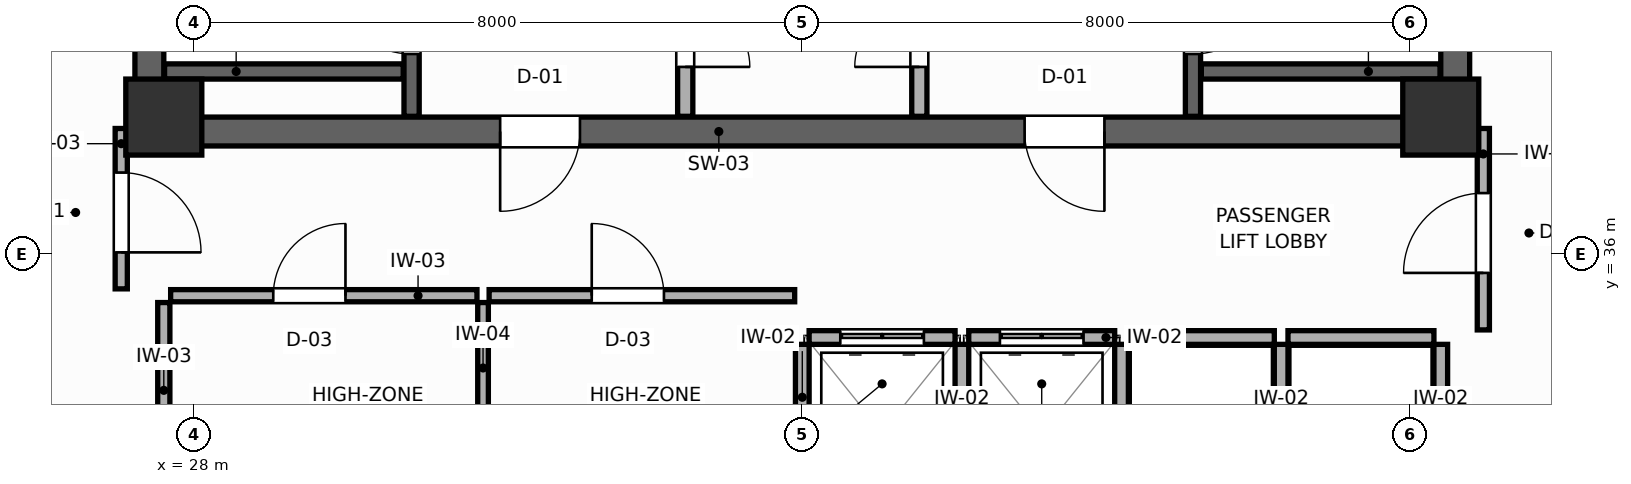
"""IFC4 building model, lengths in metres.
Left out: names, types, materials, properties, quantities, classifications, styles, units other than length and angle.
Written with IfcOpenShell. Run it as: python <this file> out.ifc"""

import sys

from ifc_helpers import new_model, si_unit, direction, frame, frame_2d, origin, origin_2d, place, context, subcontext, project, spatial, rectangle, extrude, source, transform, mapped, element, fill, save


model = new_model("IFC4")
c1 = context("Model", 3, precision=1e-05, world=origin(), true_north=direction((0.0, 1.0)))
c2 = subcontext(c1, "Body", "Model", "MODEL_VIEW")
j1 = project(units=[si_unit("LENGTHUNIT", "METRE"), si_unit("PLANEANGLEUNIT", "RADIAN")], contexts=[c1])
p1 = place(None, origin())
s1 = spatial("IfcSite", under=j1, at=p1, CompositionType="ELEMENT")
p2 = place(p1, origin())
s2 = spatial("IfcBuilding", under=s1, at=p2, CompositionType="ELEMENT")
p3 = place(p2, frame((0.0, 0.0, 227.4)))
s3 = spatial("IfcBuildingStorey", under=s2, at=p3, CompositionType="ELEMENT", Elevation=227.4)
p4 = place(p3, frame((27.22, 37.61, 0.0), z_axis=(0.0, 0.0, 1.0), x_axis=(1.0, 0.0, 0.0)))
e1 = element("IfcWall", 1, at=p4, inside=s3, PredefinedType="SHEAR", context=c2, shape_type="SweptSolid", body=[
    extrude(rectangle(XDim=17.56, YDim=0.38, at=frame_2d((8.78, 0.0))), origin(), (0.0, 0.0, 1.0), 3.6),
])
p5 = place(p4, frame((4.805, 0.0, 0.0)))
e2 = element("IfcOpeningElement", 2, at=p5, cuts=e1, PredefinedType="OPENING", context=c2, shape_type="SweptSolid", body=[
    extrude(rectangle(XDim=1.05, YDim=2.1, at=frame_2d((0.525, 1.05))), frame((0.0, 0.2, 0.0), z_axis=(0.0, -1.0, 0.0), x_axis=(1.0, 0.0, 0.0)), (0.0, 0.0, 1.0), 0.4),
])
p6 = place(p4, frame((11.705, 0.0, 0.0)))
e3 = element("IfcOpeningElement", 3, at=p6, cuts=e1, PredefinedType="OPENING", context=c2, shape_type="SweptSolid", body=[
    extrude(rectangle(XDim=1.05, YDim=2.1, at=frame_2d((0.525, 1.05))), frame((0.0, 0.2, 0.0), z_axis=(0.0, -1.0, 0.0), x_axis=(1.0, 0.0, 0.0)), (0.0, 0.0, 1.0), 0.4),
])
for number, where, z_axis, x_axis in (
    (4, (27.41, 37.8, 0.0), (0.0, 0.0, 1.0), (0.0, 1.0, 0.0)),
    (5, (44.59, 37.8, 0.0), (0.0, 0.0, 1.0), (0.0, 1.0, 0.0)),
):
    element("IfcWall", number, at=place(p3, frame(where, z_axis=z_axis, x_axis=x_axis)), inside=s3, PredefinedType="SHEAR", context=c2, shape_type="SweptSolid", body=[
        extrude(rectangle(XDim=9.0, YDim=0.38, at=frame_2d((4.5, 0.0))), origin(), (0.0, 0.0, 1.0), 3.6),
    ])
m1 = source(origin(), c2, "Body", "SweptSolid", [
    extrude(rectangle(XDim=1.0, YDim=1.0, at=origin_2d()), origin(), (0.0, 0.0, 1.0), 3.6),
])
for number, where, z_axis, x_axis in (
    (6, (27.6, 37.8, 0.0), (0.0, 0.0, 1.0), (1.0, 0.0, 0.0)),
    (7, (44.4, 37.8, 0.0), (0.0, 0.0, 1.0), (1.0, 0.0, 0.0)),
):
    element("IfcColumn", number, at=place(p3, frame(where, z_axis=z_axis, x_axis=x_axis)), inside=s3, PredefinedType="COLUMN", context=c2, shape_type="MappedRepresentation", body=[
        mapped(m1, transform((0.0, 0.0, 0.0), scale=1.0)),
    ])
p7 = place(p3, frame((30.86, 37.81, 0.0), z_axis=(0.0, 0.0, 1.0), x_axis=(0.0, 1.0, 0.0)))
e8 = element("IfcWall", 8, at=p7, inside=s3, PredefinedType="SHEAR", context=c2, shape_type="SweptSolid", body=[
    extrude(rectangle(XDim=8.98, YDim=0.2, at=frame_2d((4.49, 0.0))), origin(), (0.0, 0.0, 1.0), 3.6),
])
p8 = place(p7, frame((0.82, 0.0, 0.0)))
e9 = element("IfcOpeningElement", 9, at=p8, cuts=e8, PredefinedType="OPENING", context=c2, shape_type="SweptSolid", body=[
    extrude(rectangle(XDim=1.05, YDim=2.1, at=frame_2d((0.525, 1.05))), frame((0.0, 0.11, 0.0), z_axis=(0.0, -1.0, 0.0), x_axis=(1.0, 0.0, 0.0)), (0.0, 0.0, 1.0), 0.22),
])
p9 = place(p3, frame((27.61, 38.4, 0.0), z_axis=(0.0, 0.0, 1.0), x_axis=(1.0, 0.0, 0.0)))
e10 = element("IfcWall", 10, at=p9, inside=s3, PredefinedType="SHEAR", context=c2, shape_type="SweptSolid", body=[
    extrude(rectangle(XDim=3.14, YDim=0.2, at=frame_2d((1.57, 0.0))), origin(), (0.0, 0.0, 1.0), 3.6),
])
p10 = place(p3, frame((41.14, 37.81, 0.0), z_axis=(0.0, 0.0, 1.0), x_axis=(0.0, 1.0, 0.0)))
e11 = element("IfcWall", 11, at=p10, inside=s3, PredefinedType="SHEAR", context=c2, shape_type="SweptSolid", body=[
    extrude(rectangle(XDim=8.98, YDim=0.2, at=frame_2d((4.49, 0.0))), origin(), (0.0, 0.0, 1.0), 3.6),
])
p11 = place(p10, frame((0.82, 0.0, 0.0)))
e12 = element("IfcOpeningElement", 12, at=p11, cuts=e11, PredefinedType="OPENING", context=c2, shape_type="SweptSolid", body=[
    extrude(rectangle(XDim=1.05, YDim=2.1, at=frame_2d((0.525, 1.05))), frame((0.0, 0.11, 0.0), z_axis=(0.0, -1.0, 0.0), x_axis=(1.0, 0.0, 0.0)), (0.0, 0.0, 1.0), 0.22),
])
p12 = place(p3, frame((41.25, 38.4, 0.0), z_axis=(0.0, 0.0, 1.0), x_axis=(1.0, 0.0, 0.0)))
e13 = element("IfcWall", 13, at=p12, inside=s3, PredefinedType="SHEAR", context=c2, shape_type="SweptSolid", body=[
    extrude(rectangle(XDim=3.14, YDim=0.2, at=frame_2d((1.57, 0.0))), origin(), (0.0, 0.0, 1.0), 3.6),
])
p13 = place(p3, frame((34.46, 37.81, 0.0), z_axis=(0.0, 0.0, 1.0), x_axis=(0.0, 1.0, 0.0)))
e14 = element("IfcWall", 14, at=p13, inside=s3, PredefinedType="PARTITIONING", context=c2, shape_type="SweptSolid", body=[
    extrude(rectangle(XDim=8.98, YDim=0.2, at=frame_2d((4.49, 0.0))), origin(), (0.0, 0.0, 1.0), 3.41),
])
p14 = place(p13, frame((0.65, 0.0, 0.0)))
e15 = element("IfcOpeningElement", 15, at=p14, cuts=e14, PredefinedType="OPENING", context=c2, shape_type="SweptSolid", body=[
    extrude(rectangle(XDim=0.85, YDim=2.05, at=frame_2d((0.425, 1.025))), frame((0.0, 0.11, 0.0), z_axis=(0.0, -1.0, 0.0), x_axis=(1.0, 0.0, 0.0)), (0.0, 0.0, 1.0), 0.22),
])
p15 = place(p3, frame((37.54, 37.81, 0.0), z_axis=(0.0, 0.0, 1.0), x_axis=(0.0, 1.0, 0.0)))
e16 = element("IfcWall", 16, at=p15, inside=s3, PredefinedType="PARTITIONING", context=c2, shape_type="SweptSolid", body=[
    extrude(rectangle(XDim=8.98, YDim=0.2, at=frame_2d((4.49, 0.0))), origin(), (0.0, 0.0, 1.0), 3.41),
])
p16 = place(p15, frame((0.65, 0.0, 0.0)))
e17 = element("IfcOpeningElement", 17, at=p16, cuts=e16, PredefinedType="OPENING", context=c2, shape_type="SweptSolid", body=[
    extrude(rectangle(XDim=0.85, YDim=2.05, at=frame_2d((0.425, 1.025))), frame((0.0, 0.11, 0.0), z_axis=(0.0, -1.0, 0.0), x_axis=(1.0, 0.0, 0.0)), (0.0, 0.0, 1.0), 0.22),
])
p17 = place(p3, frame((36.09, 34.9, 0.0), z_axis=(0.0, 0.0, 1.0), x_axis=(1.0, 0.0, 0.0)))
e18 = element("IfcWall", 18, at=p17, inside=s3, PredefinedType="PARTITIONING", context=c2, shape_type="SweptSolid", body=[
    extrude(rectangle(XDim=1.92, YDim=0.18, at=frame_2d((0.96, 0.0))), origin(), (0.0, 0.0, 1.0), 3.41),
])
p18 = place(p17, frame((0.41, 0.0, 0.0)))
e19 = element("IfcOpeningElement", 19, at=p18, cuts=e18, PredefinedType="OPENING", context=c2, shape_type="SweptSolid", body=[
    extrude(rectangle(XDim=1.1, YDim=2.1, at=frame_2d((0.55, 1.05))), frame((0.0, 0.1, 0.0), z_axis=(0.0, -1.0, 0.0), x_axis=(1.0, 0.0, 0.0)), (0.0, 0.0, 1.0), 0.2),
])
p19 = place(p3, frame((36.0, 32.49, 0.0), z_axis=(0.0, 0.0, 1.0), x_axis=(0.0, 1.0, 0.0)))
e20 = element("IfcWall", 20, at=p19, inside=s3, PredefinedType="PARTITIONING", context=c2, shape_type="SweptSolid", body=[
    extrude(rectangle(XDim=2.32, YDim=0.18, at=frame_2d((1.16, 0.0))), origin(), (0.0, 0.0, 1.0), 3.41),
])
p20 = place(p3, frame((38.19, 34.9, 0.0), z_axis=(0.0, 0.0, 1.0), x_axis=(1.0, 0.0, 0.0)))
e21 = element("IfcWall", 21, at=p20, inside=s3, PredefinedType="PARTITIONING", context=c2, shape_type="SweptSolid", body=[
    extrude(rectangle(XDim=1.92, YDim=0.18, at=frame_2d((0.96, 0.0))), origin(), (0.0, 0.0, 1.0), 3.41),
])
p21 = place(p20, frame((0.41, 0.0, 0.0)))
e22 = element("IfcOpeningElement", 22, at=p21, cuts=e21, PredefinedType="OPENING", context=c2, shape_type="SweptSolid", body=[
    extrude(rectangle(XDim=1.1, YDim=2.1, at=frame_2d((0.55, 1.05))), frame((0.0, 0.1, 0.0), z_axis=(0.0, -1.0, 0.0), x_axis=(1.0, 0.0, 0.0)), (0.0, 0.0, 1.0), 0.2),
])
p22 = place(p3, frame((38.1, 32.49, 0.0), z_axis=(0.0, 0.0, 1.0), x_axis=(0.0, 1.0, 0.0)))
e23 = element("IfcWall", 23, at=p22, inside=s3, PredefinedType="PARTITIONING", context=c2, shape_type="SweptSolid", body=[
    extrude(rectangle(XDim=2.32, YDim=0.18, at=frame_2d((1.16, 0.0))), origin(), (0.0, 0.0, 1.0), 3.41),
])
p23 = place(p3, frame((40.29, 34.9, 0.0), z_axis=(0.0, 0.0, 1.0), x_axis=(1.0, 0.0, 0.0)))
e24 = element("IfcWall", 24, at=p23, inside=s3, PredefinedType="PARTITIONING", context=c2, shape_type="SweptSolid", body=[
    extrude(rectangle(XDim=1.92, YDim=0.18, at=frame_2d((0.96, 0.0))), origin(), (0.0, 0.0, 1.0), 3.41),
])
p24 = place(p3, frame((40.2, 32.49, 0.0), z_axis=(0.0, 0.0, 1.0), x_axis=(0.0, 1.0, 0.0)))
e25 = element("IfcWall", 25, at=p24, inside=s3, PredefinedType="PARTITIONING", context=c2, shape_type="SweptSolid", body=[
    extrude(rectangle(XDim=2.32, YDim=0.18, at=frame_2d((1.16, 0.0))), origin(), (0.0, 0.0, 1.0), 3.41),
])
p25 = place(p3, frame((42.39, 34.9, 0.0), z_axis=(0.0, 0.0, 1.0), x_axis=(1.0, 0.0, 0.0)))
e26 = element("IfcWall", 26, at=p25, inside=s3, PredefinedType="PARTITIONING", context=c2, shape_type="SweptSolid", body=[
    extrude(rectangle(XDim=1.92, YDim=0.18, at=frame_2d((0.96, 0.0))), origin(), (0.0, 0.0, 1.0), 3.41),
])
for number, where, z_axis, x_axis in (
    (27, (42.3, 32.49, 0.0), (0.0, 0.0, 1.0), (0.0, 1.0, 0.0)),
    (28, (44.4, 32.49, 0.0), (0.0, 0.0, 1.0), (0.0, 1.0, 0.0)),
):
    element("IfcWall", number, at=place(p3, frame(where, z_axis=z_axis, x_axis=x_axis)), inside=s3, PredefinedType="PARTITIONING", context=c2, shape_type="SweptSolid", body=[
        extrude(rectangle(XDim=2.32, YDim=0.18, at=frame_2d((1.16, 0.0))), origin(), (0.0, 0.0, 1.0), 3.41),
    ])
p26 = place(p3, frame((27.6, 33.05, 0.0), z_axis=(0.0, 0.0, 1.0), x_axis=(0.0, 1.0, 0.0)))
e29 = element("IfcWall", 29, at=p26, inside=s3, PredefinedType="PARTITIONING", context=c2, shape_type="SweptSolid", body=[
    extrude(rectangle(XDim=2.31, YDim=0.16, at=frame_2d((1.155, 0.0))), origin(), (0.0, 0.0, 1.0), 3.41),
])
p27 = place(p3, frame((31.8, 32.49, 0.0), z_axis=(0.0, 0.0, 1.0), x_axis=(0.0, 1.0, 0.0)))
e30 = element("IfcWall", 30, at=p27, inside=s3, PredefinedType="PARTITIONING", context=c2, shape_type="SweptSolid", body=[
    extrude(rectangle(XDim=2.87, YDim=0.14, at=frame_2d((1.435, 0.0))), origin(), (0.0, 0.0, 1.0), 3.41),
])
p28 = place(p3, frame((27.69, 35.45, 0.0), z_axis=(0.0, 0.0, 1.0), x_axis=(1.0, 0.0, 0.0)))
e31 = element("IfcWall", 31, at=p28, inside=s3, PredefinedType="PARTITIONING", context=c2, shape_type="SweptSolid", body=[
    extrude(rectangle(XDim=4.03, YDim=0.16, at=frame_2d((2.015, 0.0))), origin(), (0.0, 0.0, 1.0), 3.41),
])
p29 = place(p28, frame((1.35, 0.0, 0.0)))
e32 = element("IfcOpeningElement", 32, at=p29, cuts=e31, PredefinedType="OPENING", context=c2, shape_type="SweptSolid", body=[
    extrude(rectangle(XDim=0.95, YDim=2.05, at=frame_2d((0.475, 1.025))), frame((0.0, 0.09, 0.0), z_axis=(0.0, -1.0, 0.0), x_axis=(1.0, 0.0, 0.0)), (0.0, 0.0, 1.0), 0.18),
])
p30 = place(p3, frame((31.88, 35.45, 0.0), z_axis=(0.0, 0.0, 1.0), x_axis=(1.0, 0.0, 0.0)))
e33 = element("IfcWall", 33, at=p30, inside=s3, PredefinedType="PARTITIONING", context=c2, shape_type="SweptSolid", body=[
    extrude(rectangle(XDim=4.02, YDim=0.16, at=frame_2d((2.01, 0.0))), origin(), (0.0, 0.0, 1.0), 3.41),
])
p31 = place(p30, frame((1.35, 0.0, 0.0)))
e34 = element("IfcOpeningElement", 34, at=p31, cuts=e33, PredefinedType="OPENING", context=c2, shape_type="SweptSolid", body=[
    extrude(rectangle(XDim=0.95, YDim=2.05, at=frame_2d((0.475, 1.025))), frame((0.0, 0.09, 0.0), z_axis=(0.0, -1.0, 0.0), x_axis=(1.0, 0.0, 0.0)), (0.0, 0.0, 1.0), 0.18),
])
p32 = place(p3, frame((27.04, 35.54, 0.0), z_axis=(0.0, 0.0, 1.0), x_axis=(0.0, 1.0, 0.0)))
e35 = element("IfcWall", 35, at=p32, inside=s3, PredefinedType="PARTITIONING", context=c2, shape_type="SweptSolid", body=[
    extrude(rectangle(XDim=2.11, YDim=0.16, at=frame_2d((1.055, 0.0))), origin(), (0.0, 0.0, 1.0), 3.41),
])
p33 = place(p32, frame((0.48, 0.0, 0.0)))
e36 = element("IfcOpeningElement", 36, at=p33, cuts=e35, PredefinedType="OPENING", context=c2, shape_type="SweptSolid", body=[
    extrude(rectangle(XDim=1.05, YDim=2.1, at=frame_2d((0.525, 1.05))), frame((0.0, 0.09, 0.0), z_axis=(0.0, -1.0, 0.0), x_axis=(1.0, 0.0, 0.0)), (0.0, 0.0, 1.0), 0.18),
])
p34 = place(p3, frame((44.96, 35.0, 0.0), z_axis=(0.0, 0.0, 1.0), x_axis=(0.0, 1.0, 0.0)))
e37 = element("IfcWall", 37, at=p34, inside=s3, PredefinedType="PARTITIONING", context=c2, shape_type="SweptSolid", body=[
    extrude(rectangle(XDim=2.65, YDim=0.16, at=frame_2d((1.325, 0.0))), origin(), (0.0, 0.0, 1.0), 3.41),
])
p35 = place(p34, frame((0.75, 0.0, 0.0)))
e38 = element("IfcOpeningElement", 38, at=p35, cuts=e37, PredefinedType="OPENING", context=c2, shape_type="SweptSolid", body=[
    extrude(rectangle(XDim=1.05, YDim=2.1, at=frame_2d((0.525, 1.05))), frame((0.0, 0.09, 0.0), z_axis=(0.0, -1.0, 0.0), x_axis=(1.0, 0.0, 0.0)), (0.0, 0.0, 1.0), 0.18),
])
p36 = place(p8, origin())
e39 = element("IfcDoor", 39, at=p36, inside=s3, OperationType="SINGLE_SWING_RIGHT", PredefinedType="DOOR", context=c2, shape_type="SweptSolid", body=[
    extrude(rectangle(XDim=1.05, YDim=2.1, at=frame_2d((0.525, 1.05))), frame((0.0, 0.025, 0.0), z_axis=(0.0, -1.0, 0.0), x_axis=(1.0, 0.0, 0.0)), (0.0, 0.0, 1.0), 0.05),
])
fill(e9, e39)
p37 = place(p11, frame((1.05, 0.0, 0.0), z_axis=(0.0, 0.0, 1.0), x_axis=(-1.0, 0.0, 0.0)))
e40 = element("IfcDoor", 40, at=p37, inside=s3, OperationType="SINGLE_SWING_LEFT", PredefinedType="DOOR", context=c2, shape_type="SweptSolid", body=[
    extrude(rectangle(XDim=1.05, YDim=2.1, at=frame_2d((0.525, 1.05))), frame((0.0, 0.025, 0.0), z_axis=(0.0, -1.0, 0.0), x_axis=(1.0, 0.0, 0.0)), (0.0, 0.0, 1.0), 0.05),
])
fill(e12, e40)
p38 = place(p14, frame((0.85, 0.0, 0.0), z_axis=(0.0, 0.0, 1.0), x_axis=(-1.0, 0.0, 0.0)))
e41 = element("IfcDoor", 41, at=p38, inside=s3, OperationType="SINGLE_SWING_RIGHT", PredefinedType="DOOR", context=c2, shape_type="SweptSolid", body=[
    extrude(rectangle(XDim=0.85, YDim=2.05, at=frame_2d((0.425, 1.025))), frame((0.0, 0.025, 0.0), z_axis=(0.0, -1.0, 0.0), x_axis=(1.0, 0.0, 0.0)), (0.0, 0.0, 1.0), 0.05),
])
fill(e15, e41)
p39 = place(p16, origin())
e42 = element("IfcDoor", 42, at=p39, inside=s3, OperationType="SINGLE_SWING_LEFT", PredefinedType="DOOR", context=c2, shape_type="SweptSolid", body=[
    extrude(rectangle(XDim=0.85, YDim=2.05, at=frame_2d((0.425, 1.025))), frame((0.0, 0.025, 0.0), z_axis=(0.0, -1.0, 0.0), x_axis=(1.0, 0.0, 0.0)), (0.0, 0.0, 1.0), 0.05),
])
fill(e17, e42)
p40 = place(p18, origin())
e43 = element("IfcDoor", 43, at=p40, inside=s3, OperationType="DOUBLE_DOOR_SLIDING", PredefinedType="DOOR", context=c2, shape_type="SweptSolid", body=[
    extrude(rectangle(XDim=1.1, YDim=2.1, at=frame_2d((0.55, 1.05))), frame((0.0, 0.025, 0.0), z_axis=(0.0, -1.0, 0.0), x_axis=(1.0, 0.0, 0.0)), (0.0, 0.0, 1.0), 0.05),
])
fill(e19, e43)
p41 = place(p21, origin())
e44 = element("IfcDoor", 44, at=p41, inside=s3, OperationType="DOUBLE_DOOR_SLIDING", PredefinedType="DOOR", context=c2, shape_type="SweptSolid", body=[
    extrude(rectangle(XDim=1.1, YDim=2.1, at=frame_2d((0.55, 1.05))), frame((0.0, 0.025, 0.0), z_axis=(0.0, -1.0, 0.0), x_axis=(1.0, 0.0, 0.0)), (0.0, 0.0, 1.0), 0.05),
])
fill(e22, e44)
p42 = place(p29, origin())
e45 = element("IfcDoor", 45, at=p42, inside=s3, OperationType="SINGLE_SWING_RIGHT", PredefinedType="DOOR", context=c2, shape_type="SweptSolid", body=[
    extrude(rectangle(XDim=0.95, YDim=2.05, at=frame_2d((0.475, 1.025))), frame((0.0, 0.025, 0.0), z_axis=(0.0, -1.0, 0.0), x_axis=(1.0, 0.0, 0.0)), (0.0, 0.0, 1.0), 0.05),
])
fill(e32, e45)
p43 = place(p31, origin())
e46 = element("IfcDoor", 46, at=p43, inside=s3, OperationType="SINGLE_SWING_LEFT", PredefinedType="DOOR", context=c2, shape_type="SweptSolid", body=[
    extrude(rectangle(XDim=0.95, YDim=2.05, at=frame_2d((0.475, 1.025))), frame((0.0, 0.025, 0.0), z_axis=(0.0, -1.0, 0.0), x_axis=(1.0, 0.0, 0.0)), (0.0, 0.0, 1.0), 0.05),
])
fill(e34, e46)
p44 = place(p33, frame((1.05, 0.0, 0.0), z_axis=(0.0, 0.0, 1.0), x_axis=(-1.0, 0.0, 0.0)))
e47 = element("IfcDoor", 47, at=p44, inside=s3, OperationType="SINGLE_SWING_RIGHT", PredefinedType="DOOR", context=c2, shape_type="SweptSolid", body=[
    extrude(rectangle(XDim=1.05, YDim=2.1, at=frame_2d((0.525, 1.05))), frame((0.0, 0.025, 0.0), z_axis=(0.0, -1.0, 0.0), x_axis=(1.0, 0.0, 0.0)), (0.0, 0.0, 1.0), 0.05),
])
fill(e36, e47)
p45 = place(p35, origin())
e48 = element("IfcDoor", 48, at=p45, inside=s3, OperationType="SINGLE_SWING_LEFT", PredefinedType="DOOR", context=c2, shape_type="SweptSolid", body=[
    extrude(rectangle(XDim=1.05, YDim=2.1, at=frame_2d((0.525, 1.05))), frame((0.0, 0.025, 0.0), z_axis=(0.0, -1.0, 0.0), x_axis=(1.0, 0.0, 0.0)), (0.0, 0.0, 1.0), 0.05),
])
fill(e38, e48)
p46 = place(p5, frame((1.05, 0.0, 0.0), z_axis=(0.0, 0.0, 1.0), x_axis=(-1.0, 0.0, 0.0)))
e49 = element("IfcDoor", 49, at=p46, inside=s3, OperationType="SINGLE_SWING_RIGHT", PredefinedType="DOOR", context=c2, shape_type="SweptSolid", body=[
    extrude(rectangle(XDim=1.05, YDim=2.1, at=frame_2d((0.525, 1.05))), frame((0.0, 0.025, 0.0), z_axis=(0.0, -1.0, 0.0), x_axis=(1.0, 0.0, 0.0)), (0.0, 0.0, 1.0), 0.05),
])
fill(e2, e49)
p47 = place(p6, frame((1.05, 0.0, 0.0), z_axis=(0.0, 0.0, 1.0), x_axis=(-1.0, 0.0, 0.0)))
e50 = element("IfcDoor", 50, at=p47, inside=s3, OperationType="SINGLE_SWING_LEFT", PredefinedType="DOOR", context=c2, shape_type="SweptSolid", body=[
    extrude(rectangle(XDim=1.05, YDim=2.1, at=frame_2d((0.525, 1.05))), frame((0.0, 0.025, 0.0), z_axis=(0.0, -1.0, 0.0), x_axis=(1.0, 0.0, 0.0)), (0.0, 0.0, 1.0), 0.05),
])
fill(e3, e50)
save(model, sys.argv[1])
